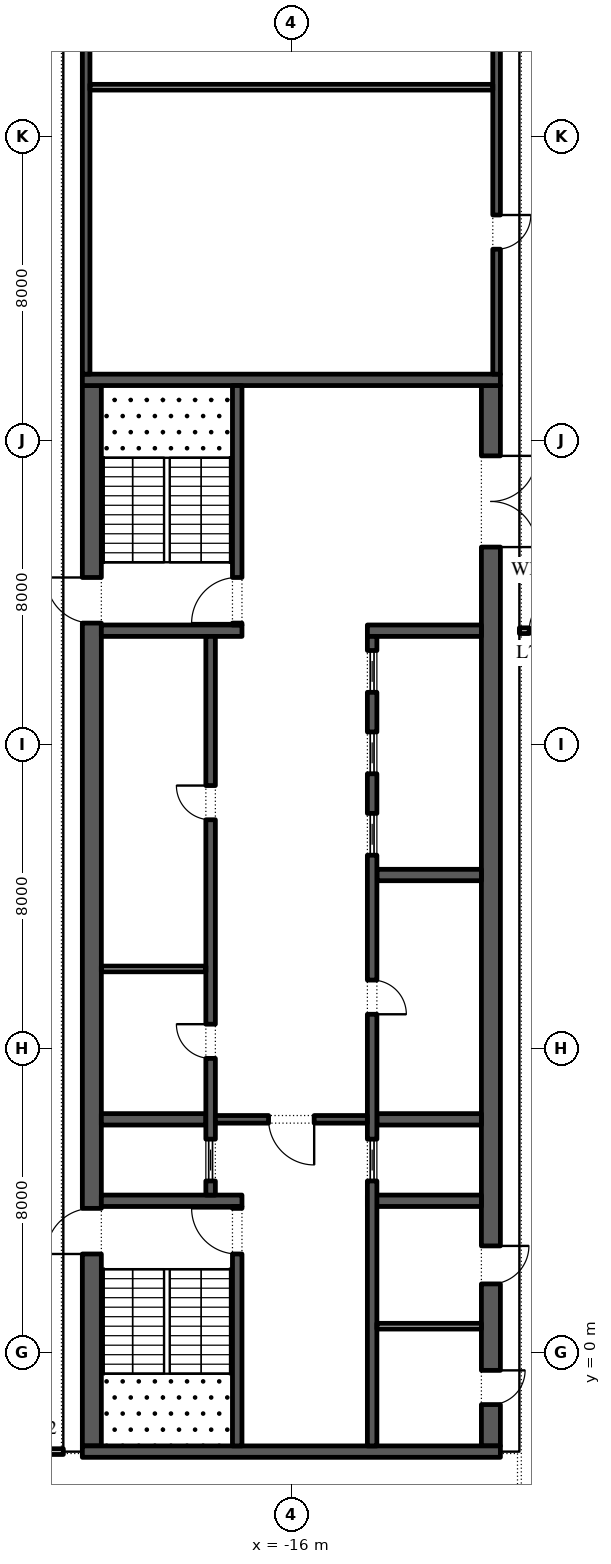
"""IFC4 building model, lengths in metres.
Left out: names, types, materials, properties, quantities, classifications, styles, units other than length and angle.
Written with IfcOpenShell. Run it as: python <this file> out.ifc"""

import sys

from ifc_helpers import new_model, si_unit, direction, frame, frame_2d, origin, place, context, subcontext, project, spatial, rectangle, extrude, element, fill, save


model = new_model("IFC4")
c1 = context("Model", 3, precision=1e-05, world=origin(), true_north=direction((0.0, 1.0)))
c2 = subcontext(c1, "Body", "Model", "MODEL_VIEW")
j1 = project(units=[si_unit("LENGTHUNIT", "METRE"), si_unit("PLANEANGLEUNIT", "RADIAN")], contexts=[c1])
p1 = place(None, origin())
s1 = spatial("IfcSite", under=j1, at=p1, CompositionType="ELEMENT")
p2 = place(p1, origin())
s2 = spatial("IfcBuilding", under=s1, at=p2, CompositionType="ELEMENT")
p3 = place(p2, frame((0.0, 0.0, 342.6)))
s3 = spatial("IfcBuildingStorey", under=s2, at=p3, CompositionType="ELEMENT", Elevation=342.6)
p4 = place(p3, frame((-21.25, -2.45, 0.0), z_axis=(0.0, 0.0, 1.0), x_axis=(0.0, 1.0, 0.0)))
e1 = element("IfcWall", 1, at=p4, inside=s3, PredefinedType="SHEAR", context=c2, shape_type="SweptSolid", body=[
    extrude(rectangle(XDim=27.9, YDim=0.5, at=frame_2d((13.95, 0.0))), origin(), (0.0, 0.0, 1.0), 4.0),
])
p5 = place(p4, frame((5.05, 0.0, 0.0)))
e2 = element("IfcOpeningElement", 2, at=p5, cuts=e1, PredefinedType="OPENING", context=c2, shape_type="SweptSolid", body=[
    extrude(rectangle(XDim=1.2, YDim=2.1, at=frame_2d((0.6, 1.05))), frame((0.0, 0.26, 0.0), z_axis=(0.0, -1.0, 0.0), x_axis=(1.0, 0.0, 0.0)), (0.0, 0.0, 1.0), 0.52),
])
p6 = place(p4, frame((21.65, 0.0, 0.0)))
e3 = element("IfcOpeningElement", 3, at=p6, cuts=e1, PredefinedType="OPENING", context=c2, shape_type="SweptSolid", body=[
    extrude(rectangle(XDim=1.2, YDim=2.1, at=frame_2d((0.6, 1.05))), frame((0.0, 0.26, 0.0), z_axis=(0.0, -1.0, 0.0), x_axis=(1.0, 0.0, 0.0)), (0.0, 0.0, 1.0), 0.52),
])
p7 = place(p3, frame((-10.75, -2.45, 0.0), z_axis=(0.0, 0.0, 1.0), x_axis=(0.0, 1.0, 0.0)))
e4 = element("IfcWall", 4, at=p7, inside=s3, PredefinedType="SHEAR", context=c2, shape_type="SweptSolid", body=[
    extrude(rectangle(XDim=27.9, YDim=0.5, at=frame_2d((13.95, 0.0))), origin(), (0.0, 0.0, 1.0), 4.0),
])
p8 = place(p7, frame((23.65, 0.0, 0.0)))
e5 = element("IfcOpeningElement", 5, at=p8, cuts=e4, PredefinedType="OPENING", context=c2, shape_type="SweptSolid", body=[
    extrude(rectangle(XDim=2.4, YDim=2.1, at=frame_2d((1.2, 1.05))), frame((0.0, 0.26, 0.0), z_axis=(0.0, -1.0, 0.0), x_axis=(1.0, 0.0, 0.0)), (0.0, 0.0, 1.0), 0.52),
])
p9 = place(p7, frame((1.087, 0.0, 0.0)))
e6 = element("IfcOpeningElement", 6, at=p9, cuts=e4, PredefinedType="OPENING", context=c2, shape_type="SweptSolid", body=[
    extrude(rectangle(XDim=0.9, YDim=2.1, at=frame_2d((0.45, 1.05))), frame((0.0, 0.26, 0.0), z_axis=(0.0, -1.0, 0.0), x_axis=(1.0, 0.0, 0.0)), (0.0, 0.0, 1.0), 0.52),
])
p10 = place(p7, frame((4.262, 0.0, 0.0)))
e7 = element("IfcOpeningElement", 7, at=p10, cuts=e4, PredefinedType="OPENING", context=c2, shape_type="SweptSolid", body=[
    extrude(rectangle(XDim=1.0, YDim=2.1, at=frame_2d((0.5, 1.05))), frame((0.0, 0.26, 0.0), z_axis=(0.0, -1.0, 0.0), x_axis=(1.0, 0.0, 0.0)), (0.0, 0.0, 1.0), 0.52),
])
for number, where, z_axis, x_axis in (
    (8, (-21.5, -2.6, 0.0), (0.0, 0.0, 1.0), (1.0, 0.0, 0.0)),
    (9, (-21.5, 25.6, 0.0), (0.0, 0.0, 1.0), (1.0, 0.0, 0.0)),
):
    element("IfcWall", number, at=place(p3, frame(where, z_axis=z_axis, x_axis=x_axis)), inside=s3, PredefinedType="SHEAR", context=c2, shape_type="SweptSolid", body=[
        extrude(rectangle(XDim=11.0, YDim=0.3, at=frame_2d((5.5, 0.0))), origin(), (0.0, 0.0, 1.0), 4.0),
    ])
p11 = place(p3, frame((-21.0, 4.0, 0.0), z_axis=(0.0, 0.0, 1.0), x_axis=(1.0, 0.0, 0.0)))
e10 = element("IfcWall", 10, at=p11, inside=s3, PredefinedType="SHEAR", context=c2, shape_type="SweptSolid", body=[
    extrude(rectangle(XDim=3.7, YDim=0.3, at=frame_2d((1.85, 0.0))), origin(), (0.0, 0.0, 1.0), 4.0),
])
p12 = place(p3, frame((-17.425, -2.45, 0.0), z_axis=(0.0, 0.0, 1.0), x_axis=(0.0, 1.0, 0.0)))
e11 = element("IfcWall", 11, at=p12, inside=s3, PredefinedType="SHEAR", context=c2, shape_type="SweptSolid", body=[
    extrude(rectangle(XDim=6.3, YDim=0.25, at=frame_2d((3.15, 0.0))), origin(), (0.0, 0.0, 1.0), 4.0),
])
p13 = place(p12, frame((5.05, 0.0, 0.0)))
e12 = element("IfcOpeningElement", 12, at=p13, cuts=e11, PredefinedType="OPENING", context=c2, shape_type="SweptSolid", body=[
    extrude(rectangle(XDim=1.2, YDim=2.1, at=frame_2d((0.6, 1.05))), frame((0.0, 0.135, 0.0), z_axis=(0.0, -1.0, 0.0), x_axis=(1.0, 0.0, 0.0)), (0.0, 0.0, 1.0), 0.27),
])
p14 = place(p3, frame((-21.0, 19.0, 0.0), z_axis=(0.0, 0.0, 1.0), x_axis=(1.0, 0.0, 0.0)))
e13 = element("IfcWall", 13, at=p14, inside=s3, PredefinedType="SHEAR", context=c2, shape_type="SweptSolid", body=[
    extrude(rectangle(XDim=3.7, YDim=0.3, at=frame_2d((1.85, 0.0))), origin(), (0.0, 0.0, 1.0), 4.0),
])
p15 = place(p3, frame((-17.425, 19.15, 0.0), z_axis=(0.0, 0.0, 1.0), x_axis=(0.0, 1.0, 0.0)))
e14 = element("IfcWall", 14, at=p15, inside=s3, PredefinedType="SHEAR", context=c2, shape_type="SweptSolid", body=[
    extrude(rectangle(XDim=6.3, YDim=0.25, at=frame_2d((3.15, 0.0))), origin(), (0.0, 0.0, 1.0), 4.0),
])
p16 = place(p15, frame((0.05, 0.0, 0.0)))
e15 = element("IfcOpeningElement", 15, at=p16, cuts=e14, PredefinedType="OPENING", context=c2, shape_type="SweptSolid", body=[
    extrude(rectangle(XDim=1.2, YDim=2.1, at=frame_2d((0.6, 1.05))), frame((0.0, 0.135, 0.0), z_axis=(0.0, -1.0, 0.0), x_axis=(1.0, 0.0, 0.0)), (0.0, 0.0, 1.0), 0.27),
])
p17 = place(p3, frame((-21.0, 6.143, 0.0), z_axis=(0.0, 0.0, 1.0), x_axis=(1.0, 0.0, 0.0)))
e16 = element("IfcWall", 16, at=p17, inside=s3, PredefinedType="SHEAR", context=c2, shape_type="SweptSolid", body=[
    extrude(rectangle(XDim=2.75, YDim=0.3, at=frame_2d((1.375, 0.0))), origin(), (0.0, 0.0, 1.0), 4.0),
])
p18 = place(p3, frame((-18.125, 4.15, 0.0), z_axis=(0.0, 0.0, 1.0), x_axis=(0.0, 1.0, 0.0)))
e17 = element("IfcWall", 17, at=p18, inside=s3, PredefinedType="SHEAR", context=c2, shape_type="SweptSolid", body=[
    extrude(rectangle(XDim=14.7, YDim=0.25, at=frame_2d((7.35, 0.0))), origin(), (0.0, 0.0, 1.0), 4.0),
])
p19 = place(p18, frame((3.596, 0.0, 0.0)))
e18 = element("IfcOpeningElement", 18, at=p19, cuts=e17, PredefinedType="OPENING", context=c2, shape_type="SweptSolid", body=[
    extrude(rectangle(XDim=0.9, YDim=2.1, at=frame_2d((0.45, 1.05))), frame((0.0, 0.135, 0.0), z_axis=(0.0, -1.0, 0.0), x_axis=(1.0, 0.0, 0.0)), (0.0, 0.0, 1.0), 0.27),
])
p20 = place(p18, frame((9.875, 0.0, 0.0)))
e19 = element("IfcOpeningElement", 19, at=p20, cuts=e17, PredefinedType="OPENING", context=c2, shape_type="SweptSolid", body=[
    extrude(rectangle(XDim=0.9, YDim=2.1, at=frame_2d((0.45, 1.05))), frame((0.0, 0.135, 0.0), z_axis=(0.0, -1.0, 0.0), x_axis=(1.0, 0.0, 0.0)), (0.0, 0.0, 1.0), 0.27),
])
p21 = place(p18, frame((0.371, 0.0, 0.0)))
e20 = element("IfcOpeningElement", 20, at=p21, cuts=e17, PredefinedType="OPENING", context=c2, shape_type="SweptSolid", body=[
    extrude(rectangle(XDim=1.1, YDim=2.1, at=frame_2d((0.55, 1.05))), frame((0.0, 0.135, 0.0), z_axis=(0.0, -1.0, 0.0), x_axis=(1.0, 0.0, 0.0)), (0.0, 0.0, 1.0), 0.27),
])
p22 = place(p3, frame((-21.0, 10.1, 0.0), z_axis=(0.0, 0.0, 1.0), x_axis=(1.0, 0.0, 0.0)))
e21 = element("IfcWall", 21, at=p22, inside=s3, PredefinedType="PARTITIONING", context=c2, shape_type="SweptSolid", body=[
    extrude(rectangle(XDim=2.75, YDim=0.15, at=frame_2d((1.375, 0.0))), origin(), (0.0, 0.0, 1.0), 4.0),
])
p23 = place(p3, frame((-14.0, 4.0, 0.0), z_axis=(0.0, 0.0, 1.0), x_axis=(1.0, 0.0, 0.0)))
e22 = element("IfcWall", 22, at=p23, inside=s3, PredefinedType="SHEAR", context=c2, shape_type="SweptSolid", body=[
    extrude(rectangle(XDim=3.0, YDim=0.3, at=frame_2d((1.5, 0.0))), origin(), (0.0, 0.0, 1.0), 4.0),
])
for number, where, z_axis, x_axis in (
    (23, (-13.75, 6.143, 0.0), (0.0, 0.0, 1.0), (1.0, 0.0, 0.0)),
    (24, (-13.75, 12.571, 0.0), (0.0, 0.0, 1.0), (1.0, 0.0, 0.0)),
):
    element("IfcWall", number, at=place(p3, frame(where, z_axis=z_axis, x_axis=x_axis)), inside=s3, PredefinedType="SHEAR", context=c2, shape_type="SweptSolid", body=[
        extrude(rectangle(XDim=2.75, YDim=0.3, at=frame_2d((1.375, 0.0))), origin(), (0.0, 0.0, 1.0), 4.0),
    ])
p24 = place(p3, frame((-14.0, 19.0, 0.0), z_axis=(0.0, 0.0, 1.0), x_axis=(1.0, 0.0, 0.0)))
e25 = element("IfcWall", 25, at=p24, inside=s3, PredefinedType="SHEAR", context=c2, shape_type="SweptSolid", body=[
    extrude(rectangle(XDim=3.0, YDim=0.3, at=frame_2d((1.5, 0.0))), origin(), (0.0, 0.0, 1.0), 4.0),
])
p25 = place(p3, frame((-13.875, -2.45, 0.0), z_axis=(0.0, 0.0, 1.0), x_axis=(0.0, 1.0, 0.0)))
e26 = element("IfcWall", 26, at=p25, inside=s3, PredefinedType="SHEAR", context=c2, shape_type="SweptSolid", body=[
    extrude(rectangle(XDim=21.3, YDim=0.25, at=frame_2d((10.65, 0.0))), origin(), (0.0, 0.0, 1.0), 4.0),
])
p26 = place(p25, frame((11.357, 0.0, 0.0)))
e27 = element("IfcOpeningElement", 27, at=p26, cuts=e26, PredefinedType="OPENING", context=c2, shape_type="SweptSolid", body=[
    extrude(rectangle(XDim=0.9, YDim=2.1, at=frame_2d((0.45, 1.05))), frame((0.0, 0.135, 0.0), z_axis=(0.0, -1.0, 0.0), x_axis=(1.0, 0.0, 0.0)), (0.0, 0.0, 1.0), 0.27),
])
p27 = place(p25, frame((6.971, 0.0, 0.0)))
e28 = element("IfcOpeningElement", 28, at=p27, cuts=e26, PredefinedType="OPENING", context=c2, shape_type="SweptSolid", body=[
    extrude(rectangle(XDim=1.1, YDim=2.1, at=frame_2d((0.55, 1.05))), frame((0.0, 0.135, 0.0), z_axis=(0.0, -1.0, 0.0), x_axis=(1.0, 0.0, 0.0)), (0.0, 0.0, 1.0), 0.27),
])
p28 = place(p25, frame((15.543, 0.0, 0.0)))
e29 = element("IfcOpeningElement", 29, at=p28, cuts=e26, PredefinedType="OPENING", context=c2, shape_type="SweptSolid", body=[
    extrude(rectangle(XDim=1.1, YDim=2.1, at=frame_2d((0.55, 1.05))), frame((0.0, 0.135, 0.0), z_axis=(0.0, -1.0, 0.0), x_axis=(1.0, 0.0, 0.0)), (0.0, 0.0, 1.0), 0.27),
])
p29 = place(p25, frame((17.686, 0.0, 0.0)))
e30 = element("IfcOpeningElement", 30, at=p29, cuts=e26, PredefinedType="OPENING", context=c2, shape_type="SweptSolid", body=[
    extrude(rectangle(XDim=1.1, YDim=2.1, at=frame_2d((0.55, 1.05))), frame((0.0, 0.135, 0.0), z_axis=(0.0, -1.0, 0.0), x_axis=(1.0, 0.0, 0.0)), (0.0, 0.0, 1.0), 0.27),
])
p30 = place(p25, frame((19.829, 0.0, 0.0)))
e31 = element("IfcOpeningElement", 31, at=p30, cuts=e26, PredefinedType="OPENING", context=c2, shape_type="SweptSolid", body=[
    extrude(rectangle(XDim=1.1, YDim=2.1, at=frame_2d((0.55, 1.05))), frame((0.0, 0.135, 0.0), z_axis=(0.0, -1.0, 0.0), x_axis=(1.0, 0.0, 0.0)), (0.0, 0.0, 1.0), 0.27),
])
p31 = place(p3, frame((-18.0, 6.143, 0.0), z_axis=(0.0, 0.0, 1.0), x_axis=(1.0, 0.0, 0.0)))
e32 = element("IfcWall", 32, at=p31, inside=s3, PredefinedType="SHEAR", context=c2, shape_type="SweptSolid", body=[
    extrude(rectangle(XDim=4.0, YDim=0.2, at=frame_2d((2.0, 0.0))), origin(), (0.0, 0.0, 1.0), 4.0),
])
p32 = place(p31, frame((1.4, 0.0, 0.0)))
e33 = element("IfcOpeningElement", 33, at=p32, cuts=e32, PredefinedType="OPENING", context=c2, shape_type="SweptSolid", body=[
    extrude(rectangle(XDim=1.2, YDim=2.1, at=frame_2d((0.6, 1.05))), frame((0.0, 0.11, 0.0), z_axis=(0.0, -1.0, 0.0), x_axis=(1.0, 0.0, 0.0)), (0.0, 0.0, 1.0), 0.22),
])
p33 = place(p3, frame((-13.75, 0.7, 0.0), z_axis=(0.0, 0.0, 1.0), x_axis=(1.0, 0.0, 0.0)))
e34 = element("IfcWall", 34, at=p33, inside=s3, PredefinedType="PARTITIONING", context=c2, shape_type="SweptSolid", body=[
    extrude(rectangle(XDim=2.75, YDim=0.15, at=frame_2d((1.375, 0.0))), origin(), (0.0, 0.0, 1.0), 4.0),
])
p34 = place(p3, frame((-21.4, 25.75, 0.0), z_axis=(0.0, 0.0, 1.0), x_axis=(0.0, 1.0, 0.0)))
e35 = element("IfcWall", 35, at=p34, inside=s3, PredefinedType="SHEAR", context=c2, shape_type="SweptSolid", body=[
    extrude(rectangle(XDim=15.05, YDim=0.2, at=frame_2d((7.525, 0.0))), origin(), (0.0, 0.0, 1.0), 4.0),
])
p35 = place(p3, frame((-10.6, 25.75, 0.0), z_axis=(0.0, 0.0, 1.0), x_axis=(0.0, 1.0, 0.0)))
e36 = element("IfcWall", 36, at=p35, inside=s3, PredefinedType="SHEAR", context=c2, shape_type="SweptSolid", body=[
    extrude(rectangle(XDim=15.05, YDim=0.2, at=frame_2d((7.525, 0.0))), origin(), (0.0, 0.0, 1.0), 4.0),
])
p36 = place(p35, frame((3.288, 0.0, 0.0)))
e37 = element("IfcOpeningElement", 37, at=p36, cuts=e36, PredefinedType="OPENING", context=c2, shape_type="SweptSolid", body=[
    extrude(rectangle(XDim=0.9, YDim=2.1, at=frame_2d((0.45, 1.05))), frame((0.0, 0.11, 0.0), z_axis=(0.0, -1.0, 0.0), x_axis=(1.0, 0.0, 0.0)), (0.0, 0.0, 1.0), 0.22),
])
p37 = place(p35, frame((10.887, 0.0, 0.0)))
e38 = element("IfcOpeningElement", 38, at=p37, cuts=e36, PredefinedType="OPENING", context=c2, shape_type="SweptSolid", body=[
    extrude(rectangle(XDim=0.9, YDim=2.1, at=frame_2d((0.45, 1.05))), frame((0.0, 0.11, 0.0), z_axis=(0.0, -1.0, 0.0), x_axis=(1.0, 0.0, 0.0)), (0.0, 0.0, 1.0), 0.22),
])
p38 = place(p3, frame((-21.3, 33.3, 0.0), z_axis=(0.0, 0.0, 1.0), x_axis=(1.0, 0.0, 0.0)))
e39 = element("IfcWall", 39, at=p38, inside=s3, PredefinedType="PARTITIONING", context=c2, shape_type="SweptSolid", body=[
    extrude(rectangle(XDim=10.6, YDim=0.15, at=frame_2d((5.3, 0.0))), origin(), (0.0, 0.0, 1.0), 4.0),
])
p39 = place(p3, frame((-24.25, -2.6, 0.0), z_axis=(0.0, 0.0, 1.0), x_axis=(1.0, 0.0, 0.0)))
e40 = element("IfcWall", 40, at=p39, inside=s3, PredefinedType="PARTITIONING", context=c2, shape_type="SweptSolid", body=[
    extrude(rectangle(XDim=2.25, YDim=0.15, at=frame_2d((1.125, 0.0))), origin(), (0.0, 0.0, 1.0), 4.0),
])
p40 = place(p3, frame((-10.0, 19.0, 0.0), z_axis=(0.0, 0.0, 1.0), x_axis=(1.0, 0.0, 0.0)))
e41 = element("IfcWall", 41, at=p40, inside=s3, PredefinedType="PARTITIONING", context=c2, shape_type="SweptSolid", body=[
    extrude(rectangle(XDim=1.515, YDim=0.15, at=frame_2d((0.757, 0.0))), origin(), (0.0, 0.0, 1.0), 4.0),
])
p41 = place(p40, frame((0.258, 0.0, 0.0)))
e42 = element("IfcOpeningElement", 42, at=p41, cuts=e41, PredefinedType="OPENING", context=c2, shape_type="SweptSolid", body=[
    extrude(rectangle(XDim=1.0, YDim=2.1, at=frame_2d((0.5, 1.05))), frame((0.0, 0.085, 0.0), z_axis=(0.0, -1.0, 0.0), x_axis=(1.0, 0.0, 0.0)), (0.0, 0.0, 1.0), 0.17),
])
p42 = place(p19, origin())
e43 = element("IfcDoor", 43, at=p42, inside=s3, OperationType="SINGLE_SWING_LEFT", PredefinedType="DOOR", context=c2, shape_type="SweptSolid", body=[
    extrude(rectangle(XDim=0.9, YDim=2.1, at=frame_2d((0.45, 1.05))), frame((0.0, 0.125, 0.0), z_axis=(0.0, -1.0, 0.0), x_axis=(1.0, 0.0, 0.0)), (0.0, 0.0, 1.0), 0.05),
])
fill(e18, e43)
p43 = place(p20, origin())
e44 = element("IfcDoor", 44, at=p43, inside=s3, OperationType="SINGLE_SWING_LEFT", PredefinedType="DOOR", context=c2, shape_type="SweptSolid", body=[
    extrude(rectangle(XDim=0.9, YDim=2.1, at=frame_2d((0.45, 1.05))), frame((0.0, 0.125, 0.0), z_axis=(0.0, -1.0, 0.0), x_axis=(1.0, 0.0, 0.0)), (0.0, 0.0, 1.0), 0.05),
])
fill(e19, e44)
p44 = place(p21, origin())
e45 = element("IfcDoor", 45, at=p44, inside=s3, OperationType="SLIDING_TO_LEFT", PredefinedType="DOOR", context=c2, shape_type="SweptSolid", body=[
    extrude(rectangle(XDim=1.1, YDim=2.1, at=frame_2d((0.55, 1.05))), frame((0.0, 0.025, 0.0), z_axis=(0.0, -1.0, 0.0), x_axis=(1.0, 0.0, 0.0)), (0.0, 0.0, 1.0), 0.05),
])
fill(e20, e45)
p45 = place(p26, frame((0.9, -0.2, 0.0), z_axis=(0.0, 0.0, 1.0), x_axis=(-1.0, 0.0, 0.0)))
e46 = element("IfcDoor", 46, at=p45, inside=s3, OperationType="SINGLE_SWING_LEFT", PredefinedType="DOOR", context=c2, shape_type="SweptSolid", body=[
    extrude(rectangle(XDim=0.9, YDim=2.1, at=frame_2d((0.45, 1.05))), frame((0.0, -0.075, 0.0), z_axis=(0.0, -1.0, 0.0), x_axis=(1.0, 0.0, 0.0)), (0.0, 0.0, 1.0), 0.05),
])
fill(e27, e46)
p46 = place(p27, origin())
e47 = element("IfcDoor", 47, at=p46, inside=s3, OperationType="SLIDING_TO_LEFT", PredefinedType="DOOR", context=c2, shape_type="SweptSolid", body=[
    extrude(rectangle(XDim=1.1, YDim=2.1, at=frame_2d((0.55, 1.05))), frame((0.0, 0.025, 0.0), z_axis=(0.0, -1.0, 0.0), x_axis=(1.0, 0.0, 0.0)), (0.0, 0.0, 1.0), 0.05),
])
fill(e28, e47)
p47 = place(p28, origin())
e48 = element("IfcDoor", 48, at=p47, inside=s3, OperationType="SLIDING_TO_LEFT", PredefinedType="DOOR", context=c2, shape_type="SweptSolid", body=[
    extrude(rectangle(XDim=1.1, YDim=2.1, at=frame_2d((0.55, 1.05))), frame((0.0, 0.025, 0.0), z_axis=(0.0, -1.0, 0.0), x_axis=(1.0, 0.0, 0.0)), (0.0, 0.0, 1.0), 0.05),
])
fill(e29, e48)
p48 = place(p29, origin())
e49 = element("IfcDoor", 49, at=p48, inside=s3, OperationType="SLIDING_TO_LEFT", PredefinedType="DOOR", context=c2, shape_type="SweptSolid", body=[
    extrude(rectangle(XDim=1.1, YDim=2.1, at=frame_2d((0.55, 1.05))), frame((0.0, 0.025, 0.0), z_axis=(0.0, -1.0, 0.0), x_axis=(1.0, 0.0, 0.0)), (0.0, 0.0, 1.0), 0.05),
])
fill(e30, e49)
p49 = place(p30, origin())
e50 = element("IfcDoor", 50, at=p49, inside=s3, OperationType="SLIDING_TO_LEFT", PredefinedType="DOOR", context=c2, shape_type="SweptSolid", body=[
    extrude(rectangle(XDim=1.1, YDim=2.1, at=frame_2d((0.55, 1.05))), frame((0.0, 0.025, 0.0), z_axis=(0.0, -1.0, 0.0), x_axis=(1.0, 0.0, 0.0)), (0.0, 0.0, 1.0), 0.05),
])
fill(e31, e50)
p50 = place(p32, frame((1.2, 0.0, 0.0), z_axis=(0.0, 0.0, 1.0), x_axis=(-1.0, 0.0, 0.0)))
e51 = element("IfcDoor", 51, at=p50, inside=s3, OperationType="SINGLE_SWING_RIGHT", PredefinedType="DOOR", context=c2, shape_type="SweptSolid", body=[
    extrude(rectangle(XDim=1.2, YDim=2.1, at=frame_2d((0.6, 1.05))), frame((0.0, 0.025, 0.0), z_axis=(0.0, -1.0, 0.0), x_axis=(1.0, 0.0, 0.0)), (0.0, 0.0, 1.0), 0.05),
])
fill(e33, e51)
p51 = place(p8, frame((2.4, 0.0, 0.0), z_axis=(0.0, 0.0, 1.0), x_axis=(-1.0, 0.0, 0.0)))
e52 = element("IfcDoor", 52, at=p51, inside=s3, OperationType="DOUBLE_DOOR_SINGLE_SWING", PredefinedType="DOOR", context=c2, shape_type="SweptSolid", body=[
    extrude(rectangle(XDim=2.4, YDim=2.1, at=frame_2d((1.2, 1.05))), frame((0.0, 0.025, 0.0), z_axis=(0.0, -1.0, 0.0), x_axis=(1.0, 0.0, 0.0)), (0.0, 0.0, 1.0), 0.05),
])
fill(e5, e52)
p52 = place(p13, origin())
e53 = element("IfcDoor", 53, at=p52, inside=s3, OperationType="SINGLE_SWING_LEFT", PredefinedType="DOOR", context=c2, shape_type="SweptSolid", body=[
    extrude(rectangle(XDim=1.2, YDim=2.1, at=frame_2d((0.6, 1.05))), frame((0.0, 0.025, 0.0), z_axis=(0.0, -1.0, 0.0), x_axis=(1.0, 0.0, 0.0)), (0.0, 0.0, 1.0), 0.05),
])
fill(e12, e53)
p53 = place(p5, origin())
e54 = element("IfcDoor", 54, at=p53, inside=s3, OperationType="SINGLE_SWING_RIGHT", PredefinedType="DOOR", context=c2, shape_type="SweptSolid", body=[
    extrude(rectangle(XDim=1.2, YDim=2.1, at=frame_2d((0.6, 1.05))), frame((0.0, 0.025, 0.0), z_axis=(0.0, -1.0, 0.0), x_axis=(1.0, 0.0, 0.0)), (0.0, 0.0, 1.0), 0.05),
])
fill(e2, e54)
p54 = place(p16, origin())
e55 = element("IfcDoor", 55, at=p54, inside=s3, OperationType="SINGLE_SWING_RIGHT", PredefinedType="DOOR", context=c2, shape_type="SweptSolid", body=[
    extrude(rectangle(XDim=1.2, YDim=2.1, at=frame_2d((0.6, 1.05))), frame((0.0, 0.025, 0.0), z_axis=(0.0, -1.0, 0.0), x_axis=(1.0, 0.0, 0.0)), (0.0, 0.0, 1.0), 0.05),
])
fill(e15, e55)
p55 = place(p6, origin())
e56 = element("IfcDoor", 56, at=p55, inside=s3, OperationType="SINGLE_SWING_LEFT", PredefinedType="DOOR", context=c2, shape_type="SweptSolid", body=[
    extrude(rectangle(XDim=1.2, YDim=2.1, at=frame_2d((0.6, 1.05))), frame((0.0, 0.025, 0.0), z_axis=(0.0, -1.0, 0.0), x_axis=(1.0, 0.0, 0.0)), (0.0, 0.0, 1.0), 0.05),
])
fill(e3, e56)
p56 = place(p9, frame((0.9, 0.45, 0.0), z_axis=(0.0, 0.0, 1.0), x_axis=(-1.0, 0.0, 0.0)))
e57 = element("IfcDoor", 57, at=p56, inside=s3, OperationType="SINGLE_SWING_RIGHT", PredefinedType="DOOR", context=c2, shape_type="SweptSolid", body=[
    extrude(rectangle(XDim=0.9, YDim=2.1, at=frame_2d((0.45, 1.05))), frame((0.0, 0.25, 0.0), z_axis=(0.0, -1.0, 0.0), x_axis=(1.0, 0.0, 0.0)), (0.0, 0.0, 1.0), 0.05),
])
fill(e6, e57)
p57 = place(p10, frame((1.0, 0.45, 0.0), z_axis=(0.0, 0.0, 1.0), x_axis=(-1.0, 0.0, 0.0)))
e58 = element("IfcDoor", 58, at=p57, inside=s3, OperationType="SINGLE_SWING_RIGHT", PredefinedType="DOOR", context=c2, shape_type="SweptSolid", body=[
    extrude(rectangle(XDim=1.0, YDim=2.1, at=frame_2d((0.5, 1.05))), frame((0.0, 0.25, 0.0), z_axis=(0.0, -1.0, 0.0), x_axis=(1.0, 0.0, 0.0)), (0.0, 0.0, 1.0), 0.05),
])
fill(e7, e58)
p58 = place(p36, frame((0.9, 0.15, 0.0), z_axis=(0.0, 0.0, 1.0), x_axis=(-1.0, 0.0, 0.0)))
e59 = element("IfcDoor", 59, at=p58, inside=s3, OperationType="SINGLE_SWING_RIGHT", PredefinedType="DOOR", context=c2, shape_type="SweptSolid", body=[
    extrude(rectangle(XDim=0.9, YDim=2.1, at=frame_2d((0.45, 1.05))), frame((0.0, 0.1, 0.0), z_axis=(0.0, -1.0, 0.0), x_axis=(1.0, 0.0, 0.0)), (0.0, 0.0, 1.0), 0.05),
])
fill(e37, e59)
p59 = place(p41, origin())
e60 = element("IfcDoor", 60, at=p59, inside=s3, OperationType="SINGLE_SWING_LEFT", PredefinedType="DOOR", context=c2, shape_type="SweptSolid", body=[
    extrude(rectangle(XDim=1.0, YDim=2.1, at=frame_2d((0.5, 1.05))), frame((0.0, 0.025, 0.0), z_axis=(0.0, -1.0, 0.0), x_axis=(1.0, 0.0, 0.0)), (0.0, 0.0, 1.0), 0.05),
])
fill(e42, e60)
save(model, sys.argv[1])
